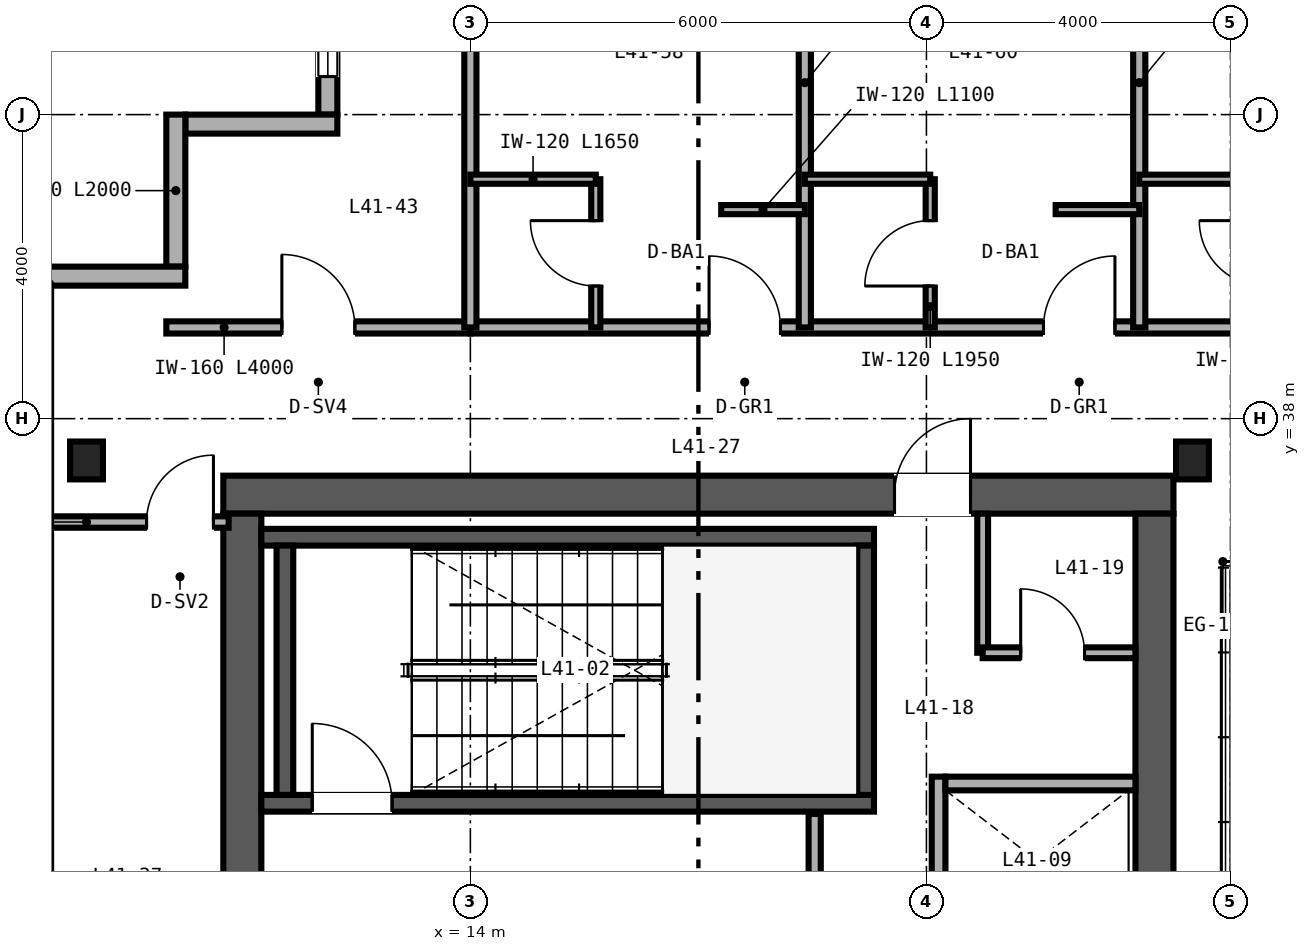
"""IFC4 building model, lengths in metres.
Left out: names, types, materials, properties, quantities, classifications, styles, units other than length and angle.
Written with IfcOpenShell. Run it as: python <this file> out.ifc"""

import sys

from ifc_helpers import new_model, si_unit, direction, frame, frame_2d, origin, origin_2d, place, context, subcontext, project, spatial, rectangle, i_section, extrude, source, transform, mapped, element, fill, save


model = new_model("IFC4")
c1 = context("Model", 3, precision=1e-05, world=origin(), true_north=direction((0.0, 1.0)))
c2 = subcontext(c1, "Body", "Model", "MODEL_VIEW")
j1 = project(units=[si_unit("LENGTHUNIT", "METRE"), si_unit("PLANEANGLEUNIT", "RADIAN")], contexts=[c1])
p1 = place(None, origin())
s1 = spatial("IfcSite", under=j1, at=p1, CompositionType="ELEMENT")
p2 = place(p1, origin())
s2 = spatial("IfcBuilding", under=s1, at=p2, CompositionType="ELEMENT")
p3 = place(p2, frame((0.0, 0.0, 166.8)))
s3 = spatial("IfcBuildingStorey", under=s2, at=p3, CompositionType="ELEMENT", Elevation=166.8)
p4 = place(p3, frame((10.75, 37.0, 0.0), z_axis=(0.0, 0.0, 1.0), x_axis=(1.0, 0.0, 0.0)))
e1 = element("IfcWall", 1, at=p4, inside=s3, PredefinedType="SHEAR", context=c2, shape_type="SweptSolid", body=[
    extrude(rectangle(XDim=12.5, YDim=0.5, at=frame_2d((6.25, 0.0))), origin(), (0.0, 0.0, 1.0), 3.37),
])
p5 = place(p4, frame((8.83, 0.0, 0.0)))
e2 = element("IfcOpeningElement", 2, at=p5, cuts=e1, PredefinedType="OPENING", context=c2, shape_type="SweptSolid", body=[
    extrude(rectangle(XDim=1.0, YDim=2.15, at=frame_2d((0.5, 1.075))), frame((0.0, 0.26, 0.0), z_axis=(0.0, -1.0, 0.0), x_axis=(1.0, 0.0, 0.0)), (0.0, 0.0, 1.0), 0.52),
])
for number, where, z_axis, x_axis in (
    (3, (11.0, 15.25, 0.0), (0.0, 0.0, 1.0), (0.0, 1.0, 0.0)),
    (4, (23.0, 15.25, 0.0), (0.0, 0.0, 1.0), (0.0, 1.0, 0.0)),
):
    element("IfcWall", number, at=place(p3, frame(where, z_axis=z_axis, x_axis=x_axis)), inside=s3, PredefinedType="SHEAR", context=c2, shape_type="SweptSolid", body=[
        extrude(rectangle(XDim=21.5, YDim=0.5, at=frame_2d((10.75, 0.0))), origin(), (0.0, 0.0, 1.0), 3.37),
    ])
p6 = place(p3, frame((11.25, 32.94, 0.0), z_axis=(0.0, 0.0, 1.0), x_axis=(1.0, 0.0, 0.0)))
e5 = element("IfcWall", 5, at=p6, inside=s3, PredefinedType="SHEAR", context=c2, shape_type="SweptSolid", body=[
    extrude(rectangle(XDim=8.06, YDim=0.22, at=frame_2d((4.03, 0.0))), origin(), (0.0, 0.0, 1.0), 3.4),
])
p7 = place(p6, frame((0.67, 0.0, 0.0)))
e6 = element("IfcOpeningElement", 6, at=p7, cuts=e5, PredefinedType="OPENING", context=c2, shape_type="SweptSolid", body=[
    extrude(rectangle(XDim=1.05, YDim=2.15, at=frame_2d((0.525, 1.075))), frame((0.0, 0.12, 0.0), z_axis=(0.0, -1.0, 0.0), x_axis=(1.0, 0.0, 0.0)), (0.0, 0.0, 1.0), 0.24),
])
p8 = place(p3, frame((11.25, 36.44, 0.0), z_axis=(0.0, 0.0, 1.0), x_axis=(1.0, 0.0, 0.0)))
e7 = element("IfcWall", 7, at=p8, inside=s3, PredefinedType="SHEAR", context=c2, shape_type="SweptSolid", body=[
    extrude(rectangle(XDim=8.06, YDim=0.22, at=frame_2d((4.03, 0.0))), origin(), (0.0, 0.0, 1.0), 3.4),
])
for number, where, z_axis, x_axis in (
    (8, (11.56, 33.05, 0.0), (0.0, 0.0, 1.0), (0.0, 1.0, 0.0)),
    (9, (19.2, 33.05, 0.0), (0.0, 0.0, 1.0), (0.0, 1.0, 0.0)),
):
    element("IfcWall", number, at=place(p3, frame(where, z_axis=z_axis, x_axis=x_axis)), inside=s3, PredefinedType="SHEAR", context=c2, shape_type="SweptSolid", body=[
        extrude(rectangle(XDim=3.28, YDim=0.22, at=frame_2d((1.64, 0.0))), origin(), (0.0, 0.0, 1.0), 3.4),
    ])
m1 = source(origin(), c2, "Body", "SweptSolid", [
    extrude(i_section(OverallWidth=0.432, OverallDepth=0.498, WebThickness=0.056, FlangeThickness=0.089, FilletRadius=0.025, at=origin_2d()), origin(), (0.0, 0.0, 1.0), 3.37),
])
for number, where, z_axis, x_axis in (
    (10, (8.95, 37.45, 0.0), (0.0, 0.0, 1.0), (1.0, 0.0, 0.0)),
    (11, (23.5, 37.45, 0.0), (0.0, 0.0, 1.0), (1.0, 0.0, 0.0)),
):
    element("IfcColumn", number, at=place(p3, frame(where, z_axis=z_axis, x_axis=x_axis)), inside=s3, PredefinedType="COLUMN", context=c2, shape_type="MappedRepresentation", body=[
        mapped(m1, transform((0.0, 0.0, 0.0), scale=1.0)),
    ])
p9 = place(p3, frame((12.125, 44.0, 0.0), z_axis=(0.0, 0.0, 1.0), x_axis=(0.0, -1.0, 0.0)))
e12 = element("IfcWall", 12, at=p9, inside=s3, PredefinedType="SOLIDWALL", context=c2, shape_type="SweptSolid", body=[
    extrude(rectangle(XDim=2.0, YDim=0.25, at=frame_2d((1.0, 0.0))), origin(), (0.0, 0.0, 1.0), 3.37),
])
p10 = place(p9, frame((0.5, 0.0, 0.85)))
e13 = element("IfcOpeningElement", 13, at=p10, cuts=e12, PredefinedType="OPENING", context=c2, shape_type="SweptSolid", body=[
    extrude(rectangle(XDim=1.0, YDim=1.9, at=frame_2d((0.5, 0.95))), frame((0.0, 0.135, 0.0), z_axis=(0.0, -1.0, 0.0), x_axis=(1.0, 0.0, 0.0)), (0.0, 0.0, 1.0), 0.27),
])
for number, where, z_axis, x_axis in (
    (14, (12.25, 41.875, 0.0), (0.0, 0.0, 1.0), (-1.0, 0.0, 0.0)),
    (15, (10.125, 42.0, 0.0), (0.0, 0.0, 1.0), (0.0, -1.0, 0.0)),
):
    element("IfcWall", number, at=place(p3, frame(where, z_axis=z_axis, x_axis=x_axis)), inside=s3, PredefinedType="SOLIDWALL", context=c2, shape_type="SweptSolid", body=[
        extrude(rectangle(XDim=2.0, YDim=0.25, at=frame_2d((1.0, 0.0))), origin(), (0.0, 0.0, 1.0), 3.37),
    ])
p11 = place(p3, frame((10.25, 39.875, 0.0), z_axis=(0.0, 0.0, 1.0), x_axis=(-1.0, 0.0, 0.0)))
e16 = element("IfcWall", 16, at=p11, inside=s3, PredefinedType="SOLIDWALL", context=c2, shape_type="SweptSolid", body=[
    extrude(rectangle(XDim=2.25, YDim=0.25, at=frame_2d((1.125, 0.0))), origin(), (0.0, 0.0, 1.0), 3.37),
])
p12 = place(p3, frame((20.16, 29.0, 0.0), z_axis=(0.0, 0.0, 1.0), x_axis=(0.0, 1.0, 0.0)))
e17 = element("IfcWall", 17, at=p12, inside=s3, PredefinedType="SOLIDWALL", context=c2, shape_type="SweptSolid", body=[
    extrude(rectangle(XDim=4.29, YDim=0.18, at=frame_2d((2.145, 0.0))), origin(), (0.0, 0.0, 1.0), 3.37),
])
p13 = place(p3, frame((20.25, 33.2, 0.0), z_axis=(0.0, 0.0, 1.0), x_axis=(1.0, 0.0, 0.0)))
e18 = element("IfcWall", 18, at=p13, inside=s3, PredefinedType="SOLIDWALL", context=c2, shape_type="SweptSolid", body=[
    extrude(rectangle(XDim=2.5, YDim=0.18, at=frame_2d((1.25, 0.0))), origin(), (0.0, 0.0, 1.0), 3.37),
])
p14 = place(p3, frame((18.53, 28.9, 0.0), z_axis=(0.0, 0.0, 1.0), x_axis=(0.0, 1.0, 0.0)))
e19 = element("IfcWall", 19, at=p14, inside=s3, PredefinedType="PARTITIONING", context=c2, shape_type="SweptSolid", body=[
    extrude(rectangle(XDim=3.9, YDim=0.16, at=frame_2d((1.95, 0.0))), origin(), (0.0, 0.0, 1.0), 3.37),
])
p15 = place(p14, frame((1.5, 0.0, 0.0)))
e20 = element("IfcOpeningElement", 20, at=p15, cuts=e19, PredefinedType="OPENING", context=c2, shape_type="SweptSolid", body=[
    extrude(rectangle(XDim=1.0, YDim=2.15, at=frame_2d((0.5, 1.075))), frame((0.0, 0.09, 0.0), z_axis=(0.0, -1.0, 0.0), x_axis=(1.0, 0.0, 0.0)), (0.0, 0.0, 1.0), 0.18),
])
p16 = place(p3, frame((20.74, 34.92, 0.0), z_axis=(0.0, 0.0, 1.0), x_axis=(0.0, 1.0, 0.0)))
e21 = element("IfcWall", 21, at=p16, inside=s3, PredefinedType="PARTITIONING", context=c2, shape_type="SweptSolid", body=[
    extrude(rectangle(XDim=1.83, YDim=0.142, at=frame_2d((0.915, 0.0))), origin(), (0.0, 0.0, 1.0), 3.37),
])
p17 = place(p3, frame((20.74, 34.92, 0.0), z_axis=(0.0, 0.0, 1.0), x_axis=(1.0, 0.0, 0.0)))
e22 = element("IfcWall", 22, at=p17, inside=s3, PredefinedType="PARTITIONING", context=c2, shape_type="SweptSolid", body=[
    extrude(rectangle(XDim=2.01, YDim=0.142, at=frame_2d((1.005, 0.0))), origin(), (0.0, 0.0, 1.0), 3.37),
])
p18 = place(p17, frame((0.5, 0.0, 0.0)))
e23 = element("IfcOpeningElement", 23, at=p18, cuts=e22, PredefinedType="OPENING", context=c2, shape_type="SweptSolid", body=[
    extrude(rectangle(XDim=0.84, YDim=2.1, at=frame_2d((0.42, 1.05))), frame((0.0, 0.081, 0.0), z_axis=(0.0, -1.0, 0.0), x_axis=(1.0, 0.0, 0.0)), (0.0, 0.0, 1.0), 0.162),
])
p19 = place(p3, frame((8.16, 36.64, 0.0), z_axis=(0.0, 0.0, 1.0), x_axis=(1.0, 0.0, 0.0)))
e24 = element("IfcWall", 24, at=p19, inside=s3, PredefinedType="PARTITIONING", context=c2, shape_type="SweptSolid", body=[
    extrude(rectangle(XDim=2.66, YDim=0.15, at=frame_2d((1.33, 0.0))), origin(), (0.0, 0.0, 1.0), 2.753),
])
p20 = place(p19, frame((1.58, 0.0, 0.0)))
e25 = element("IfcOpeningElement", 25, at=p20, cuts=e24, PredefinedType="OPENING", context=c2, shape_type="SweptSolid", body=[
    extrude(rectangle(XDim=0.88, YDim=2.15, at=frame_2d((0.44, 1.075))), frame((0.0, 0.085, 0.0), z_axis=(0.0, -1.0, 0.0), x_axis=(1.0, 0.0, 0.0)), (0.0, 0.0, 1.0), 0.17),
])
p21 = place(p3, frame((10.0, 39.2, 0.0), z_axis=(0.0, 0.0, 1.0), x_axis=(1.0, 0.0, 0.0)))
e26 = element("IfcWall", 26, at=p21, inside=s3, PredefinedType="PARTITIONING", context=c2, shape_type="SweptSolid", body=[
    extrude(rectangle(XDim=4.0, YDim=0.16, at=frame_2d((2.0, 0.0))), origin(), (0.0, 0.0, 1.0), 3.37),
])
p22 = place(p21, frame((1.52, 0.0, 0.0)))
e27 = element("IfcOpeningElement", 27, at=p22, cuts=e26, PredefinedType="OPENING", context=c2, shape_type="SweptSolid", body=[
    extrude(rectangle(XDim=0.96, YDim=2.15, at=frame_2d((0.48, 1.075))), frame((0.0, 0.09, 0.0), z_axis=(0.0, -1.0, 0.0), x_axis=(1.0, 0.0, 0.0)), (0.0, 0.0, 1.0), 0.18),
])
p23 = place(p3, frame((14.0, 39.2, 0.0), z_axis=(0.0, 0.0, 1.0), x_axis=(1.0, 0.0, 0.0)))
e28 = element("IfcWall", 28, at=p23, inside=s3, PredefinedType="PARTITIONING", context=c2, shape_type="SweptSolid", body=[
    extrude(rectangle(XDim=36.0, YDim=0.16, at=frame_2d((18.0, 0.0))), origin(), (0.0, 0.0, 1.0), 2.913),
])
p24 = place(p23, frame((3.14, 0.0, 0.0)))
e29 = element("IfcOpeningElement", 29, at=p24, cuts=e28, PredefinedType="OPENING", context=c2, shape_type="SweptSolid", body=[
    extrude(rectangle(XDim=0.94, YDim=2.15, at=frame_2d((0.47, 1.075))), frame((0.0, 0.09, 0.0), z_axis=(0.0, -1.0, 0.0), x_axis=(1.0, 0.0, 0.0)), (0.0, 0.0, 1.0), 0.18),
])
p25 = place(p23, frame((7.54, 0.0, 0.0)))
e30 = element("IfcOpeningElement", 30, at=p25, cuts=e28, PredefinedType="OPENING", context=c2, shape_type="SweptSolid", body=[
    extrude(rectangle(XDim=0.94, YDim=2.15, at=frame_2d((0.47, 1.075))), frame((0.0, 0.09, 0.0), z_axis=(0.0, -1.0, 0.0), x_axis=(1.0, 0.0, 0.0)), (0.0, 0.0, 1.0), 0.18),
])
p26 = place(p23, frame((11.94, 0.0, 0.0)))
e31 = element("IfcOpeningElement", 31, at=p26, cuts=e28, PredefinedType="OPENING", context=c2, shape_type="SweptSolid", body=[
    extrude(rectangle(XDim=0.94, YDim=2.15, at=frame_2d((0.47, 1.075))), frame((0.0, 0.09, 0.0), z_axis=(0.0, -1.0, 0.0), x_axis=(1.0, 0.0, 0.0)), (0.0, 0.0, 1.0), 0.18),
])
p27 = place(p23, frame((16.34, 0.0, 0.0)))
e32 = element("IfcOpeningElement", 32, at=p27, cuts=e28, PredefinedType="OPENING", context=c2, shape_type="SweptSolid", body=[
    extrude(rectangle(XDim=0.94, YDim=2.15, at=frame_2d((0.47, 1.075))), frame((0.0, 0.09, 0.0), z_axis=(0.0, -1.0, 0.0), x_axis=(1.0, 0.0, 0.0)), (0.0, 0.0, 1.0), 0.18),
])
p28 = place(p23, frame((20.94, 0.0, 0.0)))
e33 = element("IfcOpeningElement", 33, at=p28, cuts=e28, PredefinedType="OPENING", context=c2, shape_type="SweptSolid", body=[
    extrude(rectangle(XDim=0.94, YDim=2.15, at=frame_2d((0.47, 1.075))), frame((0.0, 0.09, 0.0), z_axis=(0.0, -1.0, 0.0), x_axis=(1.0, 0.0, 0.0)), (0.0, 0.0, 1.0), 0.18),
])
p29 = place(p23, frame((25.74, 0.0, 0.0)))
e34 = element("IfcOpeningElement", 34, at=p29, cuts=e28, PredefinedType="OPENING", context=c2, shape_type="SweptSolid", body=[
    extrude(rectangle(XDim=0.94, YDim=2.15, at=frame_2d((0.47, 1.075))), frame((0.0, 0.09, 0.0), z_axis=(0.0, -1.0, 0.0), x_axis=(1.0, 0.0, 0.0)), (0.0, 0.0, 1.0), 0.18),
])
p30 = place(p23, frame((30.24, 0.0, 0.0)))
e35 = element("IfcOpeningElement", 35, at=p30, cuts=e28, PredefinedType="OPENING", context=c2, shape_type="SweptSolid", body=[
    extrude(rectangle(XDim=0.94, YDim=2.15, at=frame_2d((0.47, 1.075))), frame((0.0, 0.09, 0.0), z_axis=(0.0, -1.0, 0.0), x_axis=(1.0, 0.0, 0.0)), (0.0, 0.0, 1.0), 0.18),
])
p31 = place(p23, frame((34.74, 0.0, 0.0)))
e36 = element("IfcOpeningElement", 36, at=p31, cuts=e28, PredefinedType="OPENING", context=c2, shape_type="SweptSolid", body=[
    extrude(rectangle(XDim=0.94, YDim=2.15, at=frame_2d((0.47, 1.075))), frame((0.0, 0.09, 0.0), z_axis=(0.0, -1.0, 0.0), x_axis=(1.0, 0.0, 0.0)), (0.0, 0.0, 1.0), 0.18),
])
for number, where, z_axis, x_axis in (
    (37, (14.0, 39.2, 0.0), (0.0, 0.0, 1.0), (0.0, 1.0, 0.0)),
    (38, (18.4, 39.2, 0.0), (0.0, 0.0, 1.0), (0.0, 1.0, 0.0)),
):
    element("IfcWall", number, at=place(p3, frame(where, z_axis=z_axis, x_axis=x_axis)), inside=s3, PredefinedType="PARTITIONING", context=c2, shape_type="SweptSolid", body=[
        extrude(rectangle(XDim=6.44, YDim=0.16, at=frame_2d((3.22, 0.0))), origin(), (0.0, 0.0, 1.0), 2.677),
    ])
p32 = place(p3, frame((15.65, 39.2, 0.0), z_axis=(0.0, 0.0, 1.0), x_axis=(0.0, 1.0, 0.0)))
e39 = element("IfcWall", 39, at=p32, inside=s3, PredefinedType="PARTITIONING", context=c2, shape_type="SweptSolid", body=[
    extrude(rectangle(XDim=1.95, YDim=0.12, at=frame_2d((0.975, 0.0))), origin(), (0.0, 0.0, 1.0), 3.37),
])
p33 = place(p32, frame((0.545, 0.0, 0.0)))
e40 = element("IfcOpeningElement", 40, at=p33, cuts=e39, PredefinedType="OPENING", context=c2, shape_type="SweptSolid", body=[
    extrude(rectangle(XDim=0.86, YDim=2.1, at=frame_2d((0.43, 1.05))), frame((0.0, 0.07, 0.0), z_axis=(0.0, -1.0, 0.0), x_axis=(1.0, 0.0, 0.0)), (0.0, 0.0, 1.0), 0.14),
])
p34 = place(p3, frame((14.0, 41.15, 0.0), z_axis=(0.0, 0.0, 1.0), x_axis=(1.0, 0.0, 0.0)))
e41 = element("IfcWall", 41, at=p34, inside=s3, PredefinedType="PARTITIONING", context=c2, shape_type="SweptSolid", body=[
    extrude(rectangle(XDim=1.65, YDim=0.12, at=frame_2d((0.825, 0.0))), origin(), (0.0, 0.0, 1.0), 3.37),
])
p35 = place(p3, frame((17.3, 40.75, 0.0), z_axis=(0.0, 0.0, 1.0), x_axis=(1.0, 0.0, 0.0)))
e42 = element("IfcWall", 42, at=p35, inside=s3, PredefinedType="PARTITIONING", context=c2, shape_type="SweptSolid", body=[
    extrude(rectangle(XDim=1.1, YDim=0.12, at=frame_2d((0.55, 0.0))), origin(), (0.0, 0.0, 1.0), 3.37),
])
p36 = place(p3, frame((22.8, 39.2, 0.0), z_axis=(0.0, 0.0, 1.0), x_axis=(0.0, 1.0, 0.0)))
e43 = element("IfcWall", 43, at=p36, inside=s3, PredefinedType="PARTITIONING", context=c2, shape_type="SweptSolid", body=[
    extrude(rectangle(XDim=6.44, YDim=0.16, at=frame_2d((3.22, 0.0))), origin(), (0.0, 0.0, 1.0), 2.833),
])
p37 = place(p3, frame((20.05, 39.2, 0.0), z_axis=(0.0, 0.0, 1.0), x_axis=(0.0, 1.0, 0.0)))
e44 = element("IfcWall", 44, at=p37, inside=s3, PredefinedType="PARTITIONING", context=c2, shape_type="SweptSolid", body=[
    extrude(rectangle(XDim=1.95, YDim=0.12, at=frame_2d((0.975, 0.0))), origin(), (0.0, 0.0, 1.0), 3.37),
])
p38 = place(p37, frame((0.545, 0.0, 0.0)))
e45 = element("IfcOpeningElement", 45, at=p38, cuts=e44, PredefinedType="OPENING", context=c2, shape_type="SweptSolid", body=[
    extrude(rectangle(XDim=0.86, YDim=2.1, at=frame_2d((0.43, 1.05))), frame((0.0, 0.07, 0.0), z_axis=(0.0, -1.0, 0.0), x_axis=(1.0, 0.0, 0.0)), (0.0, 0.0, 1.0), 0.14),
])
p39 = place(p3, frame((18.4, 41.15, 0.0), z_axis=(0.0, 0.0, 1.0), x_axis=(1.0, 0.0, 0.0)))
e46 = element("IfcWall", 46, at=p39, inside=s3, PredefinedType="PARTITIONING", context=c2, shape_type="SweptSolid", body=[
    extrude(rectangle(XDim=1.65, YDim=0.12, at=frame_2d((0.825, 0.0))), origin(), (0.0, 0.0, 1.0), 3.37),
])
p40 = place(p3, frame((21.7, 40.75, 0.0), z_axis=(0.0, 0.0, 1.0), x_axis=(1.0, 0.0, 0.0)))
e47 = element("IfcWall", 47, at=p40, inside=s3, PredefinedType="PARTITIONING", context=c2, shape_type="SweptSolid", body=[
    extrude(rectangle(XDim=1.1, YDim=0.12, at=frame_2d((0.55, 0.0))), origin(), (0.0, 0.0, 1.0), 3.37),
])
p41 = place(p3, frame((22.8, 41.15, 0.0), z_axis=(0.0, 0.0, 1.0), x_axis=(1.0, 0.0, 0.0)))
e48 = element("IfcWall", 48, at=p41, inside=s3, PredefinedType="PARTITIONING", context=c2, shape_type="SweptSolid", body=[
    extrude(rectangle(XDim=1.65, YDim=0.12, at=frame_2d((0.825, 0.0))), origin(), (0.0, 0.0, 1.0), 2.913),
])
m2 = source(origin(), c2, "Body", "SweptSolid", [
    extrude(rectangle(XDim=1.0, YDim=1.9, at=frame_2d((0.5, 0.95))), frame((0.0, 0.03, 0.0), z_axis=(0.0, -1.0, 0.0), x_axis=(1.0, 0.0, 0.0)), (0.0, 0.0, 1.0), 0.06),
])
p42 = place(p10, origin())
e49 = element("IfcWindow", 49, at=p42, inside=s3, PartitioningType="SINGLE_PANEL", PredefinedType="WINDOW", context=c2, shape_type="MappedRepresentation", body=[
    mapped(m2, transform((0.0, 0.0, 0.0), scale=1.0)),
])
fill(e13, e49)
m3 = source(origin(), c2, "Body", "SweptSolid", [
    extrude(rectangle(XDim=1.05, YDim=2.15, at=frame_2d((0.525, 1.075))), frame((0.0, 0.025, 0.0), z_axis=(0.0, -1.0, 0.0), x_axis=(1.0, 0.0, 0.0)), (0.0, 0.0, 1.0), 0.05),
])
p43 = place(p7, origin())
e50 = element("IfcDoor", 50, at=p43, inside=s3, OperationType="SINGLE_SWING_LEFT", PredefinedType="DOOR", context=c2, shape_type="MappedRepresentation", body=[
    mapped(m3, transform((0.0, 0.0, 0.0), scale=1.0)),
])
fill(e6, e50)
m4 = source(origin(), c2, "Body", "SweptSolid", [
    extrude(rectangle(XDim=0.84, YDim=2.1, at=frame_2d((0.42, 1.05))), frame((0.0, 0.025, 0.0), z_axis=(0.0, -1.0, 0.0), x_axis=(1.0, 0.0, 0.0)), (0.0, 0.0, 1.0), 0.05),
])
p44 = place(p18, origin())
e51 = element("IfcDoor", 51, at=p44, inside=s3, OperationType="SINGLE_SWING_LEFT", PredefinedType="DOOR", context=c2, shape_type="MappedRepresentation", body=[
    mapped(m4, transform((0.0, 0.0, 0.0), scale=1.0)),
])
fill(e23, e51)
m5 = source(origin(), c2, "Body", "SweptSolid", [
    extrude(rectangle(XDim=1.0, YDim=2.15, at=frame_2d((0.5, 1.075))), frame((0.0, 0.025, 0.0), z_axis=(0.0, -1.0, 0.0), x_axis=(1.0, 0.0, 0.0)), (0.0, 0.0, 1.0), 0.05),
])
p45 = place(p5, origin())
e52 = element("IfcDoor", 52, at=p45, inside=s3, OperationType="SINGLE_SWING_RIGHT", PredefinedType="DOOR", context=c2, shape_type="MappedRepresentation", body=[
    mapped(m5, transform((0.0, 0.0, 0.0), scale=1.0)),
])
fill(e2, e52)
m6 = source(origin(), c2, "Body", "SweptSolid", [
    extrude(rectangle(XDim=0.88, YDim=2.15, at=frame_2d((0.44, 1.075))), frame((0.0, 0.025, 0.0), z_axis=(0.0, -1.0, 0.0), x_axis=(1.0, 0.0, 0.0)), (0.0, 0.0, 1.0), 0.05),
])
p46 = place(p20, origin())
e53 = element("IfcDoor", 53, at=p46, inside=s3, OperationType="SINGLE_SWING_RIGHT", PredefinedType="DOOR", context=c2, shape_type="MappedRepresentation", body=[
    mapped(m6, transform((0.0, 0.0, 0.0), scale=1.0)),
])
fill(e25, e53)
m7 = source(origin(), c2, "Body", "SweptSolid", [
    extrude(rectangle(XDim=0.96, YDim=2.15, at=frame_2d((0.48, 1.075))), frame((0.0, 0.025, 0.0), z_axis=(0.0, -1.0, 0.0), x_axis=(1.0, 0.0, 0.0)), (0.0, 0.0, 1.0), 0.05),
])
p47 = place(p22, origin())
e54 = element("IfcDoor", 54, at=p47, inside=s3, OperationType="SINGLE_SWING_LEFT", PredefinedType="DOOR", context=c2, shape_type="MappedRepresentation", body=[
    mapped(m7, transform((0.0, 0.0, 0.0), scale=1.0)),
])
fill(e27, e54)
m8 = source(origin(), c2, "Body", "SweptSolid", [
    extrude(rectangle(XDim=0.86, YDim=2.1, at=frame_2d((0.43, 1.05))), frame((0.0, 0.025, 0.0), z_axis=(0.0, -1.0, 0.0), x_axis=(1.0, 0.0, 0.0)), (0.0, 0.0, 1.0), 0.05),
])
p48 = place(p33, origin())
e55 = element("IfcDoor", 55, at=p48, inside=s3, OperationType="SINGLE_SWING_RIGHT", PredefinedType="DOOR", context=c2, shape_type="MappedRepresentation", body=[
    mapped(m8, transform((0.0, 0.0, 0.0), scale=1.0)),
])
fill(e40, e55)
p49 = place(p38, origin())
e56 = element("IfcDoor", 56, at=p49, inside=s3, OperationType="SINGLE_SWING_LEFT", PredefinedType="DOOR", context=c2, shape_type="MappedRepresentation", body=[
    mapped(m8, transform((0.0, 0.0, 0.0), scale=1.0)),
])
fill(e45, e56)
m9 = source(origin(), c2, "Body", "SweptSolid", [
    extrude(rectangle(XDim=0.94, YDim=2.15, at=frame_2d((0.47, 1.075))), frame((0.0, 0.025, 0.0), z_axis=(0.0, -1.0, 0.0), x_axis=(1.0, 0.0, 0.0)), (0.0, 0.0, 1.0), 0.05),
])
p50 = place(p24, origin())
e57 = element("IfcDoor", 57, at=p50, inside=s3, OperationType="SINGLE_SWING_LEFT", PredefinedType="DOOR", context=c2, shape_type="MappedRepresentation", body=[
    mapped(m9, transform((0.0, 0.0, 0.0), scale=1.0)),
])
fill(e29, e57)
p51 = place(p25, origin())
e58 = element("IfcDoor", 58, at=p51, inside=s3, OperationType="SINGLE_SWING_RIGHT", PredefinedType="DOOR", context=c2, shape_type="MappedRepresentation", body=[
    mapped(m9, transform((0.0, 0.0, 0.0), scale=1.0)),
])
fill(e30, e58)
save(model, sys.argv[1])
